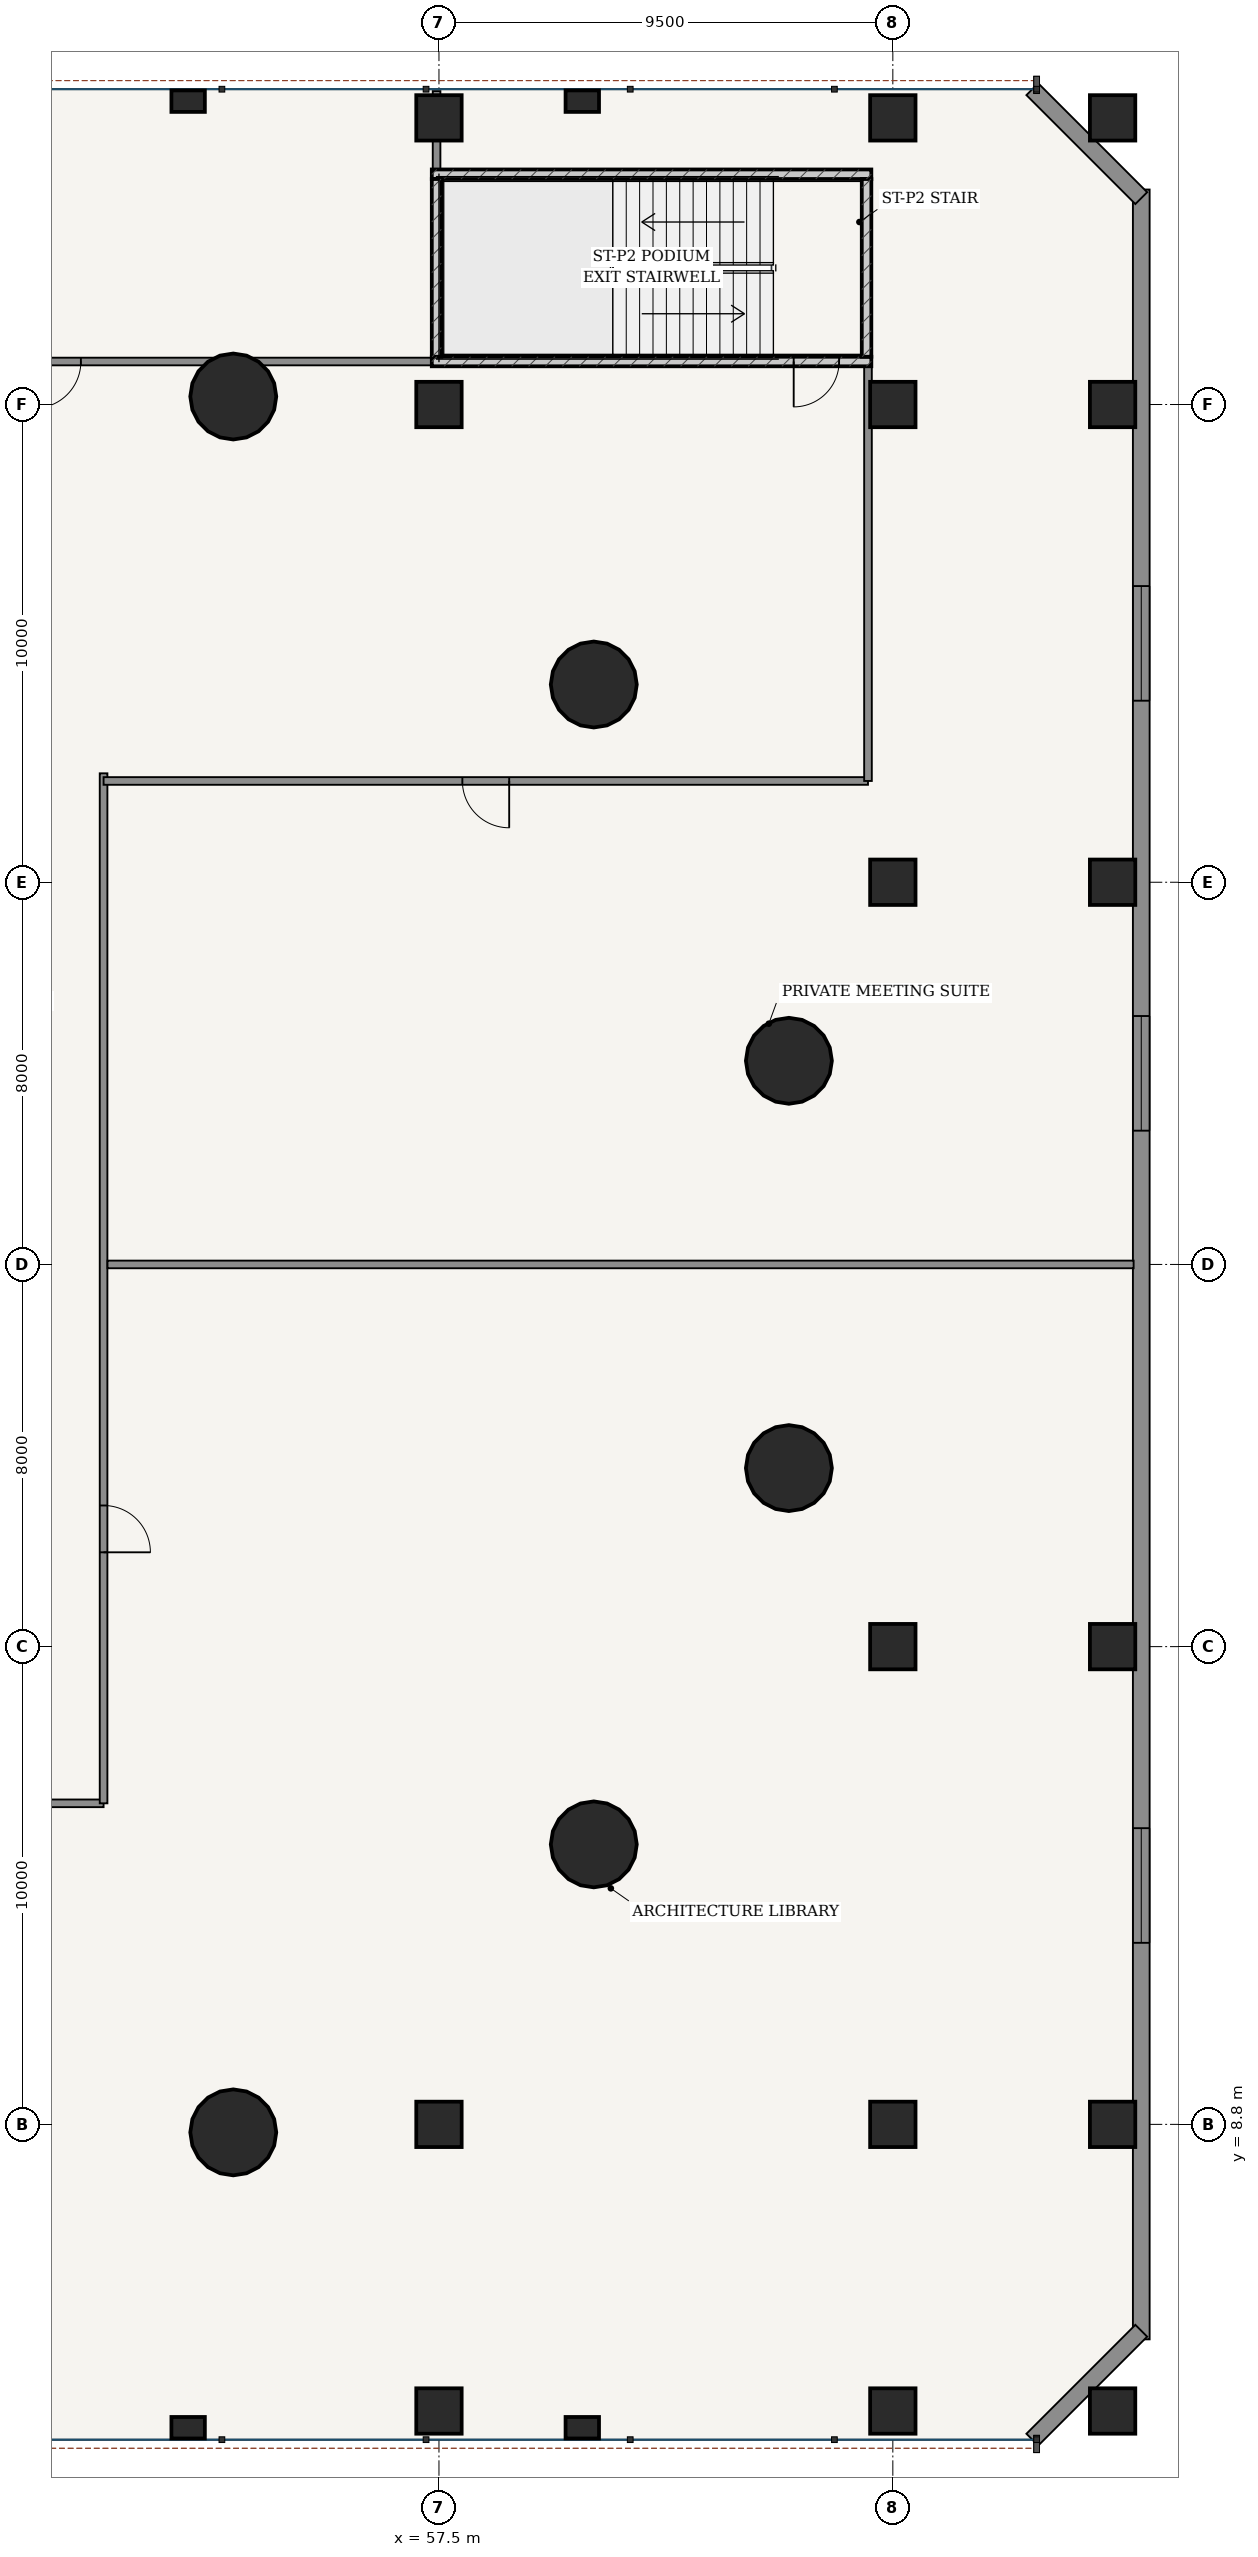
"""IFC4 building model, lengths in metres.
Left out: names, types, materials, properties, quantities, classifications, styles, units other than length and angle.
Written with IfcOpenShell. Run it as: python <this file> out.ifc"""

import sys

from ifc_helpers import new_model, si_unit, direction, frame, frame_2d, origin, origin_2d, place, context, subcontext, project, spatial, rectangle, hollow_circle, extrude, source, transform, mapped, element, fill, save


model = new_model("IFC4")
c1 = context("Model", 3, precision=1e-05, world=origin(), true_north=direction((-0.2419218956, 0.970295726276)))
c2 = subcontext(c1, "Body", "Model", "MODEL_VIEW")
j1 = project(units=[si_unit("LENGTHUNIT", "METRE"), si_unit("PLANEANGLEUNIT", "RADIAN")], contexts=[c1])
p1 = place(None, origin())
s1 = spatial("IfcSite", under=j1, at=p1, CompositionType="ELEMENT")
p2 = place(p1, origin())
s2 = spatial("IfcBuilding", under=s1, at=p2, CompositionType="ELEMENT")
p3 = place(p2, frame((0.0, 0.0, 9.9)))
s3 = spatial("IfcBuildingStorey", under=s2, at=p3, CompositionType="ELEMENT", Elevation=9.9)
p4 = place(p3, frame((57.35, 45.7, 0.0), z_axis=(0.0, 0.0, 1.0), x_axis=(1.0, 0.0, 0.0)))
e1 = element("IfcWall", 1, at=p4, inside=s3, PredefinedType="SOLIDWALL", context=c2, shape_type="SweptSolid", body=[
    extrude(rectangle(XDim=9.2, YDim=0.2, at=frame_2d((4.6, 0.0))), origin(), (0.0, 0.0, 1.0), 4.2),
])
p5 = place(p4, frame((7.575, 0.0, 0.0)))
e2 = element("IfcOpeningElement", 2, at=p5, cuts=e1, PredefinedType="OPENING", context=c2, shape_type="SweptSolid", body=[
    extrude(rectangle(XDim=0.95, YDim=2.15, at=frame_2d((0.475, 1.075))), frame((0.0, 0.11, 0.0), z_axis=(0.0, -1.0, 0.0), x_axis=(1.0, 0.0, 0.0)), (0.0, 0.0, 1.0), 0.22),
])
p6 = place(p3, frame((57.35, 49.62, 0.0), z_axis=(0.0, 0.0, 1.0), x_axis=(1.0, 0.0, 0.0)))
e3 = element("IfcWall", 3, at=p6, inside=s3, PredefinedType="SOLIDWALL", context=c2, shape_type="SweptSolid", body=[
    extrude(rectangle(XDim=9.2, YDim=0.2, at=frame_2d((4.6, 0.0))), origin(), (0.0, 0.0, 1.0), 4.2),
])
for number, where, z_axis, x_axis in (
    (4, (57.45, 45.8, 0.0), (0.0, 0.0, 1.0), (0.0, 1.0, 0.0)),
    (5, (66.45, 45.8, 0.0), (0.0, 0.0, 1.0), (0.0, 1.0, 0.0)),
):
    element("IfcWall", number, at=place(p3, frame(where, z_axis=z_axis, x_axis=x_axis)), inside=s3, PredefinedType="SOLIDWALL", context=c2, shape_type="SweptSolid", body=[
        extrude(rectangle(XDim=3.72, YDim=0.2, at=frame_2d((1.86, 0.0))), origin(), (0.0, 0.0, 1.0), 4.2),
    ])
for number, where, z_axis, x_axis in (
    (6, (64.824, 31.063, 0.0), (0.0, 0.0, 1.0), (1.0, 0.0, 0.0)),
    (7, (60.741, 38.939, 0.0), (0.0, 0.0, 1.0), (1.0, 0.0, 0.0)),
    (8, (53.195, 44.968, 0.0), (0.0, 0.0, 1.0), (1.0, 0.0, 0.0)),
    (9, (53.195, 8.632, 0.0), (0.0, 0.0, 1.0), (1.0, 0.0, 0.0)),
    (10, (60.741, 14.661, 0.0), (0.0, 0.0, 1.0), (1.0, 0.0, 0.0)),
    (11, (64.824, 22.537, 0.0), (0.0, 0.0, 1.0), (1.0, 0.0, 0.0)),
):
    element("IfcColumn", number, at=place(p3, frame(where, z_axis=z_axis, x_axis=x_axis)), inside=s3, PredefinedType="COLUMN", context=c2, shape_type="SweptSolid", body=[
        extrude(hollow_circle(Radius=0.9, WallThickness=0.055, at=origin_2d()), origin(), (0.0, 0.0, 1.0), 4.5),
    ])
for number, where, z_axis, x_axis in (
    (12, (57.5, 2.8, 0.0), (0.0, 0.0, 1.0), (1.0, 0.0, 0.0)),
    (13, (57.5, 8.8, 0.0), (0.0, 0.0, 1.0), (1.0, 0.0, 0.0)),
    (14, (57.5, 44.8, 0.0), (0.0, 0.0, 1.0), (1.0, 0.0, 0.0)),
    (15, (57.5, 50.8, 0.0), (0.0, 0.0, 1.0), (1.0, 0.0, 0.0)),
    (16, (67.0, 2.8, 0.0), (0.0, 0.0, 1.0), (1.0, 0.0, 0.0)),
    (17, (67.0, 8.8, 0.0), (0.0, 0.0, 1.0), (1.0, 0.0, 0.0)),
    (18, (67.0, 18.8, 0.0), (0.0, 0.0, 1.0), (1.0, 0.0, 0.0)),
    (19, (67.0, 34.8, 0.0), (0.0, 0.0, 1.0), (1.0, 0.0, 0.0)),
    (20, (67.0, 44.8, 0.0), (0.0, 0.0, 1.0), (1.0, 0.0, 0.0)),
    (21, (67.0, 50.8, 0.0), (0.0, 0.0, 1.0), (1.0, 0.0, 0.0)),
    (22, (71.6, 2.8, 0.0), (0.0, 0.0, 1.0), (1.0, 0.0, 0.0)),
    (23, (71.6, 8.8, 0.0), (0.0, 0.0, 1.0), (1.0, 0.0, 0.0)),
    (24, (71.6, 18.8, 0.0), (0.0, 0.0, 1.0), (1.0, 0.0, 0.0)),
    (25, (71.6, 34.8, 0.0), (0.0, 0.0, 1.0), (1.0, 0.0, 0.0)),
    (26, (71.6, 44.8, 0.0), (0.0, 0.0, 1.0), (1.0, 0.0, 0.0)),
    (27, (71.6, 50.8, 0.0), (0.0, 0.0, 1.0), (1.0, 0.0, 0.0)),
):
    element("IfcColumn", number, at=place(p3, frame(where, z_axis=z_axis, x_axis=x_axis)), inside=s3, PredefinedType="COLUMN", context=c2, shape_type="SweptSolid", body=[
        extrude(rectangle(XDim=0.95, YDim=0.95, at=origin_2d()), origin(), (0.0, 0.0, 1.0), 4.5),
    ])
for number, where, z_axis, x_axis in (
    (28, (52.25, 2.45, 0.0), (0.0, 0.0, 1.0), (1.0, 0.0, 0.0)),
    (29, (52.25, 51.15, 0.0), (0.0, 0.0, 1.0), (1.0, 0.0, 0.0)),
    (30, (60.5, 2.45, 0.0), (0.0, 0.0, 1.0), (1.0, 0.0, 0.0)),
    (31, (60.5, 51.15, 0.0), (0.0, 0.0, 1.0), (1.0, 0.0, 0.0)),
):
    element("IfcColumn", number, at=place(p3, frame(where, z_axis=z_axis, x_axis=x_axis)), inside=s3, PredefinedType="PILASTER", context=c2, shape_type="SweptSolid", body=[
        extrude(rectangle(XDim=0.7, YDim=0.45, at=origin_2d()), origin(), (0.0, 0.0, 1.0), 4.5),
    ])
p7 = place(p3, frame((72.2, 4.3, 0.0), z_axis=(0.0, 0.0, 1.0), x_axis=(0.0, 1.0, 0.0)))
e32 = element("IfcWall", 32, at=p7, inside=s3, PredefinedType="SOLIDWALL", context=c2, shape_type="SweptSolid", body=[
    extrude(rectangle(XDim=45.0, YDim=0.35, at=frame_2d((22.5, 0.0))), origin(), (0.0, 0.0, 1.0), 4.2),
])
p8 = place(p7, frame((8.3, 0.0, 0.85)))
e33 = element("IfcOpeningElement", 33, at=p8, cuts=e32, PredefinedType="OPENING", context=c2, shape_type="SweptSolid", body=[
    extrude(rectangle(XDim=2.4, YDim=2.2, at=frame_2d((1.2, 1.1))), frame((0.0, 0.185, 0.0), z_axis=(0.0, -1.0, 0.0), x_axis=(1.0, 0.0, 0.0)), (0.0, 0.0, 1.0), 0.37),
])
p9 = place(p7, frame((25.3, 0.0, 0.85)))
e34 = element("IfcOpeningElement", 34, at=p9, cuts=e32, PredefinedType="OPENING", context=c2, shape_type="SweptSolid", body=[
    extrude(rectangle(XDim=2.4, YDim=2.2, at=frame_2d((1.2, 1.1))), frame((0.0, 0.185, 0.0), z_axis=(0.0, -1.0, 0.0), x_axis=(1.0, 0.0, 0.0)), (0.0, 0.0, 1.0), 0.37),
])
p10 = place(p7, frame((34.3, 0.0, 0.85)))
e35 = element("IfcOpeningElement", 35, at=p10, cuts=e32, PredefinedType="OPENING", context=c2, shape_type="SweptSolid", body=[
    extrude(rectangle(XDim=2.4, YDim=2.2, at=frame_2d((1.2, 1.1))), frame((0.0, 0.185, 0.0), z_axis=(0.0, -1.0, 0.0), x_axis=(1.0, 0.0, 0.0)), (0.0, 0.0, 1.0), 0.37),
])
for number, where, z_axis, x_axis in (
    (36, (69.92, 2.2, 0.0), (0.0, 0.0, 1.0), (0.707, 0.707, 0.0)),
    (37, (72.2, 49.12, 0.0), (0.0, 0.0, 1.0), (-0.707, 0.707, 0.0)),
):
    element("IfcWall", number, at=place(p3, frame(where, z_axis=z_axis, x_axis=x_axis)), inside=s3, PredefinedType="SOLIDWALL", context=c2, shape_type="SweptSolid", body=[
        extrude(rectangle(XDim=3.224, YDim=0.35, at=frame_2d((1.612, 0.0))), origin(), (0.0, 0.0, 1.0), 3.235),
    ])
p11 = place(p3, frame((25.52, 15.52, 0.0), z_axis=(0.0, 0.0, 1.0), x_axis=(1.0, 0.0, 0.0)))
e38 = element("IfcWall", 38, at=p11, inside=s3, PredefinedType="PARTITIONING", context=c2, shape_type="SweptSolid", body=[
    extrude(rectangle(XDim=24.96, YDim=0.16, at=frame_2d((12.48, 0.0))), origin(), (0.0, 0.0, 1.0), 3.55),
])
p12 = place(p11, frame((5.854, 0.0, 0.0)))
e39 = element("IfcOpeningElement", 39, at=p12, cuts=e38, PredefinedType="OPENING", context=c2, shape_type="SweptSolid", body=[
    extrude(rectangle(XDim=0.98, YDim=2.2, at=frame_2d((0.49, 1.1))), frame((0.0, 0.09, 0.0), z_axis=(0.0, -1.0, 0.0), x_axis=(1.0, 0.0, 0.0)), (0.0, 0.0, 1.0), 0.18),
])
p13 = place(p11, frame((18.125, 0.0, 0.0)))
e40 = element("IfcOpeningElement", 40, at=p13, cuts=e38, PredefinedType="OPENING", context=c2, shape_type="SweptSolid", body=[
    extrude(rectangle(XDim=0.98, YDim=2.2, at=frame_2d((0.49, 1.1))), frame((0.0, 0.09, 0.0), z_axis=(0.0, -1.0, 0.0), x_axis=(1.0, 0.0, 0.0)), (0.0, 0.0, 1.0), 0.18),
])
p14 = place(p3, frame((50.48, 15.52, 0.0), z_axis=(0.0, 0.0, 1.0), x_axis=(0.0, 1.0, 0.0)))
e41 = element("IfcWall", 41, at=p14, inside=s3, PredefinedType="PARTITIONING", context=c2, shape_type="SweptSolid", body=[
    extrude(rectangle(XDim=21.56, YDim=0.16, at=frame_2d((10.78, 0.0))), origin(), (0.0, 0.0, 1.0), 3.55),
])
p15 = place(p14, frame((5.254, 0.0, 0.0)))
e42 = element("IfcOpeningElement", 42, at=p15, cuts=e41, PredefinedType="OPENING", context=c2, shape_type="SweptSolid", body=[
    extrude(rectangle(XDim=0.98, YDim=2.2, at=frame_2d((0.49, 1.1))), frame((0.0, 0.09, 0.0), z_axis=(0.0, -1.0, 0.0), x_axis=(1.0, 0.0, 0.0)), (0.0, 0.0, 1.0), 0.18),
])
p16 = place(p3, frame((50.48, 36.92, 0.0), z_axis=(0.0, 0.0, 1.0), x_axis=(1.0, 0.0, 0.0)))
e43 = element("IfcWall", 43, at=p16, inside=s3, PredefinedType="PARTITIONING", context=c2, shape_type="SweptSolid", body=[
    extrude(rectangle(XDim=16.0, YDim=0.16, at=frame_2d((8.0, 0.0))), origin(), (0.0, 0.0, 1.0), 3.55),
])
p17 = place(p16, frame((7.51, 0.0, 0.0)))
e44 = element("IfcOpeningElement", 44, at=p17, cuts=e43, PredefinedType="OPENING", context=c2, shape_type="SweptSolid", body=[
    extrude(rectangle(XDim=0.98, YDim=2.2, at=frame_2d((0.49, 1.1))), frame((0.0, 0.09, 0.0), z_axis=(0.0, -1.0, 0.0), x_axis=(1.0, 0.0, 0.0)), (0.0, 0.0, 1.0), 0.18),
])
p18 = place(p3, frame((66.48, 36.92, 0.0), z_axis=(0.0, 0.0, 1.0), x_axis=(0.0, 1.0, 0.0)))
e45 = element("IfcWall", 45, at=p18, inside=s3, PredefinedType="PARTITIONING", context=c2, shape_type="SweptSolid", body=[
    extrude(rectangle(XDim=8.78, YDim=0.16, at=frame_2d((4.39, 0.0))), origin(), (0.0, 0.0, 1.0), 3.569),
])
p19 = place(p3, frame((18.55, 45.7, 0.0), z_axis=(0.0, 0.0, 1.0), x_axis=(1.0, 0.0, 0.0)))
e46 = element("IfcWall", 46, at=p19, inside=s3, PredefinedType="PARTITIONING", context=c2, shape_type="SweptSolid", body=[
    extrude(rectangle(XDim=38.9, YDim=0.16, at=frame_2d((19.45, 0.0))), origin(), (0.0, 0.0, 1.0), 3.55),
])
p20 = place(p19, frame((7.505, 0.0, 0.0)))
e47 = element("IfcOpeningElement", 47, at=p20, cuts=e46, PredefinedType="OPENING", context=c2, shape_type="SweptSolid", body=[
    extrude(rectangle(XDim=0.86, YDim=2.1, at=frame_2d((0.43, 1.05))), frame((0.0, 0.09, 0.0), z_axis=(0.0, -1.0, 0.0), x_axis=(1.0, 0.0, 0.0)), (0.0, 0.0, 1.0), 0.18),
])
p21 = place(p19, frame((19.02, 0.0, 0.0)))
e48 = element("IfcOpeningElement", 48, at=p21, cuts=e46, PredefinedType="OPENING", context=c2, shape_type="SweptSolid", body=[
    extrude(rectangle(XDim=0.86, YDim=2.1, at=frame_2d((0.43, 1.05))), frame((0.0, 0.09, 0.0), z_axis=(0.0, -1.0, 0.0), x_axis=(1.0, 0.0, 0.0)), (0.0, 0.0, 1.0), 0.18),
])
p22 = place(p19, frame((30.475, 0.0, 0.0)))
e49 = element("IfcOpeningElement", 49, at=p22, cuts=e46, PredefinedType="OPENING", context=c2, shape_type="SweptSolid", body=[
    extrude(rectangle(XDim=0.98, YDim=2.2, at=frame_2d((0.49, 1.1))), frame((0.0, 0.09, 0.0), z_axis=(0.0, -1.0, 0.0), x_axis=(1.0, 0.0, 0.0)), (0.0, 0.0, 1.0), 0.18),
])
p23 = place(p3, frame((50.562, 26.8, 0.0), z_axis=(0.0, 0.0, 1.0), x_axis=(1.0, 0.0, 0.0)))
e50 = element("IfcWall", 50, at=p23, inside=s3, PredefinedType="PARTITIONING", context=c2, shape_type="SweptSolid", body=[
    extrude(rectangle(XDim=21.478, YDim=0.16, at=frame_2d((10.739, 0.0))), origin(), (0.0, 0.0, 1.0), 3.642),
])
p24 = place(p3, frame((57.45, 49.722, 0.0), z_axis=(0.0, 0.0, 1.0), x_axis=(0.0, 1.0, 0.0)))
e51 = element("IfcWall", 51, at=p24, inside=s3, PredefinedType="PARTITIONING", context=c2, shape_type="SweptSolid", body=[
    extrude(rectangle(XDim=1.638, YDim=0.16, at=frame_2d((0.819, 0.0))), origin(), (0.0, 0.0, 1.0), 3.235),
])
m1 = source(origin(), c2, "Body", "SweptSolid", [
    extrude(rectangle(XDim=2.4, YDim=2.2, at=frame_2d((1.2, 1.1))), frame((0.0, 0.03, 0.0), z_axis=(0.0, -1.0, 0.0), x_axis=(1.0, 0.0, 0.0)), (0.0, 0.0, 1.0), 0.06),
])
p25 = place(p8, origin())
e52 = element("IfcWindow", 52, at=p25, inside=s3, PartitioningType="SINGLE_PANEL", PredefinedType="WINDOW", context=c2, shape_type="MappedRepresentation", body=[
    mapped(m1, transform((0.0, 0.0, 0.0), scale=1.0)),
])
fill(e33, e52)
p26 = place(p9, origin())
e53 = element("IfcWindow", 53, at=p26, inside=s3, PartitioningType="SINGLE_PANEL", PredefinedType="WINDOW", context=c2, shape_type="MappedRepresentation", body=[
    mapped(m1, transform((0.0, 0.0, 0.0), scale=1.0)),
])
fill(e34, e53)
p27 = place(p10, origin())
e54 = element("IfcWindow", 54, at=p27, inside=s3, PartitioningType="SINGLE_PANEL", PredefinedType="WINDOW", context=c2, shape_type="MappedRepresentation", body=[
    mapped(m1, transform((0.0, 0.0, 0.0), scale=1.0)),
])
fill(e35, e54)
m2 = source(origin(), c2, "Body", "SweptSolid", [
    extrude(rectangle(XDim=0.95, YDim=2.15, at=frame_2d((0.475, 1.075))), frame((0.0, 0.025, 0.0), z_axis=(0.0, -1.0, 0.0), x_axis=(1.0, 0.0, 0.0)), (0.0, 0.0, 1.0), 0.05),
])
p28 = place(p5, frame((0.95, 0.0, 0.0), z_axis=(0.0, 0.0, 1.0), x_axis=(-1.0, 0.0, 0.0)))
e55 = element("IfcDoor", 55, at=p28, inside=s3, OperationType="SINGLE_SWING_RIGHT", PredefinedType="DOOR", context=c2, shape_type="MappedRepresentation", body=[
    mapped(m2, transform((0.0, 0.0, 0.0), scale=1.0)),
])
fill(e2, e55)
m3 = source(origin(), c2, "Body", "SweptSolid", [
    extrude(rectangle(XDim=0.98, YDim=2.2, at=frame_2d((0.49, 1.1))), frame((0.0, 0.025, 0.0), z_axis=(0.0, -1.0, 0.0), x_axis=(1.0, 0.0, 0.0)), (0.0, 0.0, 1.0), 0.05),
])
p29 = place(p15, frame((0.98, 0.0, 0.0), z_axis=(0.0, 0.0, 1.0), x_axis=(-1.0, 0.0, 0.0)))
e56 = element("IfcDoor", 56, at=p29, inside=s3, OperationType="SINGLE_SWING_RIGHT", PredefinedType="DOOR", context=c2, shape_type="MappedRepresentation", body=[
    mapped(m3, transform((0.0, 0.0, 0.0), scale=1.0)),
])
fill(e42, e56)
p30 = place(p17, frame((0.98, 0.0, 0.0), z_axis=(0.0, 0.0, 1.0), x_axis=(-1.0, 0.0, 0.0)))
e57 = element("IfcDoor", 57, at=p30, inside=s3, OperationType="SINGLE_SWING_LEFT", PredefinedType="DOOR", context=c2, shape_type="MappedRepresentation", body=[
    mapped(m3, transform((0.0, 0.0, 0.0), scale=1.0)),
])
fill(e44, e57)
p31 = place(p22, frame((0.98, 0.0, 0.0), z_axis=(0.0, 0.0, 1.0), x_axis=(-1.0, 0.0, 0.0)))
e58 = element("IfcDoor", 58, at=p31, inside=s3, OperationType="SINGLE_SWING_RIGHT", PredefinedType="DOOR", context=c2, shape_type="MappedRepresentation", body=[
    mapped(m3, transform((0.0, 0.0, 0.0), scale=1.0)),
])
fill(e49, e58)
save(model, sys.argv[1])
